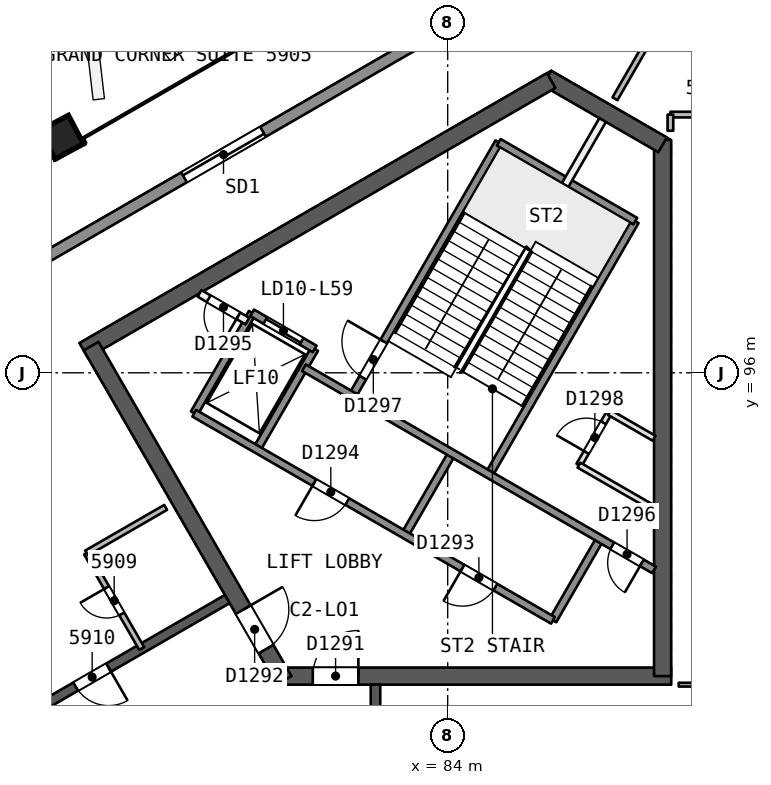
"""IFC4 building model, lengths in metres.
Left out: names, types, materials, properties, quantities, classifications, styles, units other than length and angle.
Written with IfcOpenShell. Run it as: python <this file> out.ifc"""

import sys

from ifc_helpers import new_model, si_unit, direction, frame, frame_2d, origin, origin_2d, place, context, subcontext, project, spatial, rectangle, extrude, element, fill, save


model = new_model("IFC4")
c1 = context("Model", 3, precision=1e-05, world=origin(), true_north=direction((0.0, 1.0)))
c2 = subcontext(c1, "Body", "Model", "MODEL_VIEW")
j1 = project(units=[si_unit("LENGTHUNIT", "METRE"), si_unit("PLANEANGLEUNIT", "RADIAN")], contexts=[c1])
p1 = place(None, origin())
s1 = spatial("IfcSite", under=j1, at=p1, CompositionType="ELEMENT")
p2 = place(p1, origin())
s2 = spatial("IfcBuilding", under=s1, at=p2, CompositionType="ELEMENT")
p3 = place(p2, frame((0.0, 0.0, 239.1)))
s3 = spatial("IfcBuildingStorey", under=s2, at=p3, CompositionType="ELEMENT", Elevation=239.1)
p4 = place(p3, frame((79.63, 88.019, 0.0), z_axis=(0.0, 0.0, 1.0), x_axis=(1.0, 0.0, 0.0)))
e1 = element("IfcWall", 1, at=p4, inside=s3, PredefinedType="SHEAR", context=c2, shape_type="SweptSolid", body=[
    extrude(rectangle(XDim=10.25, YDim=0.45, at=frame_2d((5.125, 0.0))), origin(), (0.0, 0.0, 1.0), 3.7),
])
p5 = place(p4, frame((0.82, 0.0, 0.0)))
e2 = element("IfcOpeningElement", 2, at=p5, cuts=e1, PredefinedType="OPENING", context=c2, shape_type="SweptSolid", body=[
    extrude(rectangle(XDim=1.2, YDim=2.1, at=frame_2d((0.6, 1.05))), frame((0.0, 0.235, 0.0), z_axis=(0.0, -1.0, 0.0), x_axis=(1.0, 0.0, 0.0)), (0.0, 0.0, 1.0), 0.471),
])
p6 = place(p3, frame((89.655, 88.019, 0.0), z_axis=(0.0, 0.0, 1.0), x_axis=(0.0, 1.0, 0.0)))
e3 = element("IfcWall", 3, at=p6, inside=s3, PredefinedType="SHEAR", context=c2, shape_type="SweptSolid", body=[
    extrude(rectangle(XDim=14.108, YDim=0.45, at=frame_2d((7.054, 0.0))), origin(), (0.0, 0.0, 1.0), 3.7),
])
p7 = place(p3, frame((89.655, 101.998, 0.0), z_axis=(0.0, 0.0, 1.0), x_axis=(-0.866042179588, 0.49997094233, 0.0)))
e4 = element("IfcWall", 4, at=p7, inside=s3, PredefinedType="SHEAR", context=c2, shape_type="SweptSolid", body=[
    extrude(rectangle(XDim=3.515, YDim=0.45, at=frame_2d((1.758, 0.0))), origin(), (0.0, 0.0, 1.0), 3.7),
])
p8 = place(p3, frame((86.723, 103.69, 0.0), z_axis=(0.0, 0.0, 1.0), x_axis=(-0.866022713978, -0.500004658852, 0.0)))
e5 = element("IfcWall", 5, at=p8, inside=s3, PredefinedType="SHEAR", context=c2, shape_type="SweptSolid", body=[
    extrude(rectangle(XDim=14.203, YDim=0.45, at=frame_2d((7.102, 0.0))), origin(), (0.0, 0.0, 1.0), 3.7),
])
p9 = place(p3, frame((74.617, 96.701, 0.0), z_axis=(0.0, 0.0, 1.0), x_axis=(0.499994385119, -0.866028645513, 0.0)))
e6 = element("IfcWall", 6, at=p9, inside=s3, PredefinedType="SHEAR", context=c2, shape_type="SweptSolid", body=[
    extrude(rectangle(XDim=10.155, YDim=0.45, at=frame_2d((5.077, 0.0))), origin(), (0.0, 0.0, 1.0), 3.7),
])
p10 = place(p9, frame((8.005, 0.0, 0.0)))
e7 = element("IfcOpeningElement", 7, at=p10, cuts=e6, PredefinedType="OPENING", context=c2, shape_type="SweptSolid", body=[
    extrude(rectangle(XDim=1.2, YDim=2.1, at=frame_2d((0.6, 1.05))), frame((0.0, 0.235, 0.0), z_axis=(0.0, -1.0, 0.0), x_axis=(1.0, 0.0, 0.0)), (0.0, 0.0, 1.0), 0.471),
])
p11 = place(p3, frame((82.1, 72.206, 0.0), z_axis=(0.0, 0.0, 1.0), x_axis=(0.0, 1.0, 0.0)))
e8 = element("IfcWall", 8, at=p11, inside=s3, PredefinedType="SHEAR", context=c2, shape_type="SweptSolid", body=[
    extrude(rectangle(XDim=15.588, YDim=0.25, at=frame_2d((7.794, 0.0))), origin(), (0.0, 0.0, 1.0), 3.3),
])
p12 = place(p11, frame((1.527, 0.0, 0.0)))
e9 = element("IfcOpeningElement", 9, at=p12, cuts=e8, PredefinedType="OPENING", context=c2, shape_type="SweptSolid", body=[
    extrude(rectangle(XDim=1.0, YDim=2.1, at=frame_2d((0.5, 1.05))), frame((0.0, 0.135, 0.0), z_axis=(0.0, -1.0, 0.0), x_axis=(1.0, 0.0, 0.0)), (0.0, 0.0, 1.0), 0.271),
])
p13 = place(p11, frame((5.396, 0.0, 0.0)))
e10 = element("IfcOpeningElement", 10, at=p13, cuts=e8, PredefinedType="OPENING", context=c2, shape_type="SweptSolid", body=[
    extrude(rectangle(XDim=0.9, YDim=2.1, at=frame_2d((0.45, 1.05))), frame((0.0, 0.135, 0.0), z_axis=(0.0, -1.0, 0.0), x_axis=(1.0, 0.0, 0.0)), (0.0, 0.0, 1.0), 0.271),
])
p14 = place(p11, frame((8.981, 0.0, 0.0)))
e11 = element("IfcOpeningElement", 11, at=p14, cuts=e8, PredefinedType="OPENING", context=c2, shape_type="SweptSolid", body=[
    extrude(rectangle(XDim=0.9, YDim=2.1, at=frame_2d((0.45, 1.05))), frame((0.0, 0.135, 0.0), z_axis=(0.0, -1.0, 0.0), x_axis=(1.0, 0.0, 0.0)), (0.0, 0.0, 1.0), 0.271),
])
p15 = place(p11, frame((12.906, 0.0, 0.0)))
e12 = element("IfcOpeningElement", 12, at=p15, cuts=e8, PredefinedType="OPENING", context=c2, shape_type="SweptSolid", body=[
    extrude(rectangle(XDim=1.0, YDim=2.1, at=frame_2d((0.5, 1.05))), frame((0.0, 0.135, 0.0), z_axis=(0.0, -1.0, 0.0), x_axis=(1.0, 0.0, 0.0)), (0.0, 0.0, 1.0), 0.271),
])
p16 = place(p3, frame((78.2, 90.046, 0.0), z_axis=(0.0, 0.0, 1.0), x_axis=(-0.866026492143, -0.499998114903, 0.0)))
e13 = element("IfcWall", 13, at=p16, inside=s3, PredefinedType="SHEAR", context=c2, shape_type="SweptSolid", body=[
    extrude(rectangle(XDim=15.588, YDim=0.25, at=frame_2d((7.794, 0.0))), origin(), (0.0, 0.0, 1.0), 3.3),
])
p17 = place(p16, frame((3.606, 0.0, 0.0)))
e14 = element("IfcOpeningElement", 14, at=p17, cuts=e13, PredefinedType="OPENING", context=c2, shape_type="SweptSolid", body=[
    extrude(rectangle(XDim=1.0, YDim=2.1, at=frame_2d((0.5, 1.05))), frame((0.0, 0.135, 0.0), z_axis=(0.0, -1.0, 0.0), x_axis=(1.0, 0.0, 0.0)), (0.0, 0.0, 1.0), 0.271),
])
p18 = place(p16, frame((8.315, 0.0, 0.0)))
e15 = element("IfcOpeningElement", 15, at=p18, cuts=e13, PredefinedType="OPENING", context=c2, shape_type="SweptSolid", body=[
    extrude(rectangle(XDim=1.1, YDim=2.1, at=frame_2d((0.55, 1.05))), frame((0.0, 0.135, 0.0), z_axis=(0.0, -1.0, 0.0), x_axis=(1.0, 0.0, 0.0)), (0.0, 0.0, 1.0), 0.271),
])
p19 = place(p16, frame((12.027, 0.0, 0.0)))
e16 = element("IfcOpeningElement", 16, at=p19, cuts=e13, PredefinedType="OPENING", context=c2, shape_type="SweptSolid", body=[
    extrude(rectangle(XDim=1.2, YDim=2.4, at=frame_2d((0.6, 1.2))), frame((0.0, 0.135, 0.0), z_axis=(0.0, -1.0, 0.0), x_axis=(1.0, 0.0, 0.0)), (0.0, 0.0, 1.0), 0.271),
])
p20 = place(p3, frame((73.841, 102.227, 0.0), z_axis=(0.000857578916, -0.022824792675, 0.999739112668), x_axis=(0.866060219769, 0.499825848733, 0.01066848966)))
e17 = element("IfcColumn", 17, at=p20, inside=s3, PredefinedType="COLUMN", context=c2, shape_type="SweptSolid", body=[
    extrude(rectangle(XDim=0.85, YDim=0.85, at=origin_2d()), origin(), (0.0, 0.0, 1.0), 3.701),
])
p21 = place(p3, frame((92.129, 87.794, 0.0), z_axis=(0.0, 0.0, 1.0), x_axis=(-1.0, 0.0, 0.0)))
e18 = element("IfcWall", 18, at=p21, inside=s3, PredefinedType="PARTITIONING", context=c2, shape_type="SweptSolid", body=[
    extrude(rectangle(XDim=2.05, YDim=0.1, at=frame_2d((1.025, 0.0))), origin(), (0.0, 0.0, 1.0), 3.3),
])
p22 = place(p21, frame((0.575, 0.0, 0.0)))
e19 = element("IfcOpeningElement", 19, at=p22, cuts=e18, PredefinedType="OPENING", context=c2, shape_type="SweptSolid", body=[
    extrude(rectangle(XDim=0.9, YDim=2.1, at=frame_2d((0.45, 1.05))), frame((0.0, 0.061, 0.0), z_axis=(0.0, -1.0, 0.0), x_axis=(1.0, 0.0, 0.0)), (0.0, 0.0, 1.0), 0.121),
])
p23 = place(p3, frame((92.088, 102.794, 0.0), z_axis=(0.0, 0.0, 1.0), x_axis=(-1.0, 0.0, 0.0)))
e20 = element("IfcWall", 20, at=p23, inside=s3, PredefinedType="PARTITIONING", context=c2, shape_type="SweptSolid", body=[
    extrude(rectangle(XDim=2.227, YDim=0.15, at=frame_2d((1.114, 0.0))), origin(), (0.0, 0.0, 1.0), 3.3),
])
p24 = place(p23, frame((0.807, 0.0, 0.0)))
e21 = element("IfcOpeningElement", 21, at=p24, cuts=e20, PredefinedType="OPENING", context=c2, shape_type="SweptSolid", body=[
    extrude(rectangle(XDim=0.8, YDim=2.1, at=frame_2d((0.4, 1.05))), frame((0.0, 0.085, 0.0), z_axis=(0.0, -1.0, 0.0), x_axis=(1.0, 0.0, 0.0)), (0.0, 0.0, 1.0), 0.171),
])
p25 = place(p3, frame((89.861, 102.794, 0.0), z_axis=(0.0, 0.0, 1.0), x_axis=(0.0, -1.0, 0.0)))
e22 = element("IfcWall", 22, at=p25, inside=s3, PredefinedType="PARTITIONING", context=c2, shape_type="SweptSolid", body=[
    extrude(rectangle(XDim=0.426, YDim=0.15, at=frame_2d((0.213, 0.0))), origin(), (0.0, 0.0, 1.0), 3.3),
])
p26 = place(p3, frame((90.004, 105.985, 0.0), z_axis=(0.0, 0.0, 1.0), x_axis=(-0.500023670775, -0.866011737025, 0.0)))
e23 = element("IfcWall", 23, at=p26, inside=s3, PredefinedType="PARTITIONING", context=c2, shape_type="SweptSolid", body=[
    extrude(rectangle(XDim=3.204, YDim=0.15, at=frame_2d((1.602, 0.0))), origin(), (0.0, 0.0, 1.0), 3.3),
])
p27 = place(p3, frame((75.948, 88.746, 0.0), z_axis=(0.0, 0.0, 1.0), x_axis=(-0.499987231761, 0.866032775405, 0.0)))
e24 = element("IfcWall", 24, at=p27, inside=s3, PredefinedType="PARTITIONING", context=c2, shape_type="SweptSolid", body=[
    extrude(rectangle(XDim=2.9, YDim=0.15, at=frame_2d((1.45, 0.0))), origin(), (0.0, 0.0, 1.0), 3.3),
])
p28 = place(p27, frame((1.05, 0.0, 0.0)))
e25 = element("IfcOpeningElement", 25, at=p28, cuts=e24, PredefinedType="OPENING", context=c2, shape_type="SweptSolid", body=[
    extrude(rectangle(XDim=0.8, YDim=2.1, at=frame_2d((0.4, 1.05))), frame((0.0, 0.085, 0.0), z_axis=(0.0, -1.0, 0.0), x_axis=(1.0, 0.0, 0.0)), (0.0, 0.0, 1.0), 0.171),
])
p29 = place(p3, frame((74.498, 91.257, 0.0), z_axis=(0.0, 0.0, 1.0), x_axis=(0.866038271014, 0.499977712642, 0.0)))
e26 = element("IfcWall", 26, at=p29, inside=s3, PredefinedType="PARTITIONING", context=c2, shape_type="SweptSolid", body=[
    extrude(rectangle(XDim=2.401, YDim=0.15, at=frame_2d((1.2, 0.0))), origin(), (0.0, 0.0, 1.0), 3.3),
])
p30 = place(p3, frame((44.845, 82.542, 0.0), z_axis=(0.0, 0.0, 1.0), x_axis=(0.866025459945, 0.499999902727, 0.0)))
e27 = element("IfcWall", 27, at=p30, inside=s3, PredefinedType="SOLIDWALL", context=c2, shape_type="SweptSolid", body=[
    extrude(rectangle(XDim=49.688, YDim=0.3, at=frame_2d((24.844, 0.0))), origin(), (0.0, 0.0, 1.0), 3.3),
])
p31 = place(p30, frame((23.8, 0.0, 0.0)))
e28 = element("IfcOpeningElement", 28, at=p31, cuts=e27, PredefinedType="OPENING", context=c2, shape_type="SweptSolid", body=[
    extrude(rectangle(XDim=2.4, YDim=2.4, at=frame_2d((1.2, 1.2))), frame((0.0, 0.161, 0.0), z_axis=(0.0, -1.0, 0.0), x_axis=(1.0, 0.0, 0.0)), (0.0, 0.0, 1.0), 0.321),
])
p32 = place(p30, frame((10.243, 0.0, 0.0)))
e29 = element("IfcOpeningElement", 29, at=p32, cuts=e27, PredefinedType="OPENING", context=c2, shape_type="SweptSolid", body=[
    extrude(rectangle(XDim=2.4, YDim=2.4, at=frame_2d((1.2, 1.2))), frame((0.0, 0.161, 0.0), z_axis=(0.0, -1.0, 0.0), x_axis=(1.0, 0.0, 0.0)), (0.0, 0.0, 1.0), 0.321),
])
p33 = place(p30, frame((37.201, 0.0, 0.0)))
e30 = element("IfcOpeningElement", 30, at=p33, cuts=e27, PredefinedType="OPENING", context=c2, shape_type="SweptSolid", body=[
    extrude(rectangle(XDim=2.4, YDim=2.4, at=frame_2d((1.2, 1.2))), frame((0.0, 0.161, 0.0), z_axis=(0.0, -1.0, 0.0), x_axis=(1.0, 0.0, 0.0)), (0.0, 0.0, 1.0), 0.321),
])
p34 = place(p3, frame((86.77, 89.486, 0.0), z_axis=(0.0, 0.0, 1.0), x_axis=(0.499961042966, 0.86604789447, 0.0)))
e31 = element("IfcWall", 31, at=p34, inside=s3, PredefinedType="SOLIDWALL", context=c2, shape_type="SweptSolid", body=[
    extrude(rectangle(XDim=2.48, YDim=0.2, at=frame_2d((1.24, 0.0))), origin(), (0.0, 0.0, 1.0), 3.3),
])
p35 = place(p3, frame((87.454, 93.571, 0.0), z_axis=(0.0, 0.0, 1.0), x_axis=(0.499995408039, 0.866028054938, 0.0)))
e32 = element("IfcWall", 32, at=p35, inside=s3, PredefinedType="PARTITIONING", context=c2, shape_type="SweptSolid", body=[
    extrude(rectangle(XDim=1.6, YDim=0.15, at=frame_2d((0.8, 0.0))), origin(), (0.0, 0.0, 1.0), 3.3),
])
p36 = place(p35, frame((0.387, 0.0, 0.0)))
e33 = element("IfcOpeningElement", 33, at=p36, cuts=e32, PredefinedType="OPENING", context=c2, shape_type="SweptSolid", body=[
    extrude(rectangle(XDim=0.9, YDim=2.1, at=frame_2d((0.45, 1.05))), frame((0.0, 0.085, 0.0), z_axis=(0.0, -1.0, 0.0), x_axis=(1.0, 0.0, 0.0)), (0.0, 0.0, 1.0), 0.171),
])
p37 = place(p3, frame((85.087, 93.321, 0.0), z_axis=(0.0, 0.0, 1.0), x_axis=(0.500019787375, 0.866013979237, 0.0)))
e34 = element("IfcWall", 34, at=p37, inside=s3, PredefinedType="SOLIDWALL", context=c2, shape_type="SweptSolid", body=[
    extrude(rectangle(XDim=7.7, YDim=0.2, at=frame_2d((3.85, 0.0))), origin(), (0.0, 0.0, 1.0), 3.3),
])
p38 = place(p3, frame((82.873, 91.736, 0.0), z_axis=(0.0, 0.0, 1.0), x_axis=(0.499961042966, 0.86604789447, 0.0)))
e35 = element("IfcWall", 35, at=p38, inside=s3, PredefinedType="SOLIDWALL", context=c2, shape_type="SweptSolid", body=[
    extrude(rectangle(XDim=2.48, YDim=0.2, at=frame_2d((1.24, 0.0))), origin(), (0.0, 0.0, 1.0), 3.3),
])
p39 = place(p3, frame((87.09, 100.94, 0.0), z_axis=(0.0, 0.0, 1.0), x_axis=(0.500011643316, 0.866018681408, 0.0)))
e36 = element("IfcWall", 36, at=p39, inside=s3, PredefinedType="PARTITIONING", context=c2, shape_type="SweptSolid", body=[
    extrude(rectangle(XDim=1.973, YDim=0.2, at=frame_2d((0.987, 0.0))), origin(), (0.0, 0.0, 1.0), 3.3),
])
p40 = place(p3, frame((81.493, 95.396, 0.0), z_axis=(0.0, 0.0, 1.0), x_axis=(0.500006057782, 0.866021906294, 0.0)))
e37 = element("IfcWall", 37, at=p40, inside=s3, PredefinedType="SOLIDWALL", context=c2, shape_type="SweptSolid", body=[
    extrude(rectangle(XDim=7.7, YDim=0.2, at=frame_2d((3.85, 0.0))), origin(), (0.0, 0.0, 1.0), 3.3),
])
p41 = place(p40, frame((0.55, 0.0, 0.0)))
e38 = element("IfcOpeningElement", 38, at=p41, cuts=e37, PredefinedType="OPENING", context=c2, shape_type="SweptSolid", body=[
    extrude(rectangle(XDim=1.1, YDim=2.1, at=frame_2d((0.55, 1.05))), frame((0.0, 0.11, 0.0), z_axis=(0.0, -1.0, 0.0), x_axis=(1.0, 0.0, 0.0)), (0.0, 0.0, 1.0), 0.221),
])
for number, where, z_axis, x_axis in (
    (39, (78.976, 93.986, 0.0), (0.0, 0.0, 1.0), (0.5, 0.866, 0.0)),
    (40, (77.33, 94.936, 0.0), (0.0, 0.0, 1.0), (0.5, 0.866, 0.0)),
):
    element("IfcWall", number, at=place(p3, frame(where, z_axis=z_axis, x_axis=x_axis)), inside=s3, PredefinedType="SOLIDWALL", context=c2, shape_type="SweptSolid", body=[
        extrude(rectangle(XDim=3.05, YDim=0.2, at=frame_2d((1.525, 0.0))), origin(), (0.0, 0.0, 1.0), 3.3),
    ])
p42 = place(p3, frame((86.77, 89.486, 0.0), z_axis=(0.0, 0.0, 1.0), x_axis=(-0.86601811187, 0.500012629753, 0.0)))
e41 = element("IfcWall", 41, at=p42, inside=s3, PredefinedType="SOLIDWALL", context=c2, shape_type="SweptSolid", body=[
    extrude(rectangle(XDim=10.9, YDim=0.2, at=frame_2d((5.45, 0.0))), origin(), (0.0, 0.0, 1.0), 3.3),
])
p43 = place(p42, frame((1.75, 0.0, 0.0)))
e42 = element("IfcOpeningElement", 42, at=p43, cuts=e41, PredefinedType="OPENING", context=c2, shape_type="SweptSolid", body=[
    extrude(rectangle(XDim=1.0, YDim=2.1, at=frame_2d((0.5, 1.05))), frame((0.0, 0.11, 0.0), z_axis=(0.0, -1.0, 0.0), x_axis=(1.0, 0.0, 0.0)), (0.0, 0.0, 1.0), 0.221),
])
p44 = place(p42, frame((6.25, 0.0, 0.0)))
e43 = element("IfcOpeningElement", 43, at=p44, cuts=e41, PredefinedType="OPENING", context=c2, shape_type="SweptSolid", body=[
    extrude(rectangle(XDim=1.0, YDim=2.1, at=frame_2d((0.5, 1.05))), frame((0.0, 0.11, 0.0), z_axis=(0.0, -1.0, 0.0), x_axis=(1.0, 0.0, 0.0)), (0.0, 0.0, 1.0), 0.221),
])
p45 = place(p3, frame((89.43, 90.814, 0.0), z_axis=(0.0, 0.0, 1.0), x_axis=(-0.866018983788, 0.500011119594, 0.0)))
e44 = element("IfcWall", 44, at=p45, inside=s3, PredefinedType="SOLIDWALL", context=c2, shape_type="SweptSolid", body=[
    extrude(rectangle(XDim=10.64, YDim=0.2, at=frame_2d((5.32, 0.0))), origin(), (0.0, 0.0, 1.0), 3.3),
])
p46 = place(p45, frame((0.37, 0.0, 0.0)))
e45 = element("IfcOpeningElement", 45, at=p46, cuts=e44, PredefinedType="OPENING", context=c2, shape_type="SweptSolid", body=[
    extrude(rectangle(XDim=0.9, YDim=2.1, at=frame_2d((0.45, 1.05))), frame((0.0, 0.11, 0.0), z_axis=(0.0, -1.0, 0.0), x_axis=(1.0, 0.0, 0.0)), (0.0, 0.0, 1.0), 0.221),
])
p47 = place(p3, frame((78.73, 97.361, 0.0), z_axis=(0.0, 0.0, 1.0), x_axis=(-0.866045896294, 0.499964504253, 0.0)))
e46 = element("IfcWall", 46, at=p47, inside=s3, PredefinedType="PARTITIONING", context=c2, shape_type="SweptSolid", body=[
    extrude(rectangle(XDim=1.455, YDim=0.2, at=frame_2d((0.728, 0.0))), origin(), (0.0, 0.0, 1.0), 3.3),
])
p48 = place(p47, frame((0.278, 0.0, 0.0)))
e47 = element("IfcOpeningElement", 47, at=p48, cuts=e46, PredefinedType="OPENING", context=c2, shape_type="SweptSolid", body=[
    extrude(rectangle(XDim=0.9, YDim=2.1, at=frame_2d((0.45, 1.05))), frame((0.0, 0.11, 0.0), z_axis=(0.0, -1.0, 0.0), x_axis=(1.0, 0.0, 0.0)), (0.0, 0.0, 1.0), 0.221),
])
p49 = place(p3, frame((80.5, 96.627, 0.0), z_axis=(0.0, 0.0, 1.0), x_axis=(-0.86601224135, 0.500022797313, 0.0)))
e48 = element("IfcWall", 48, at=p49, inside=s3, PredefinedType="SOLIDWALL", context=c2, shape_type="SweptSolid", body=[
    extrude(rectangle(XDim=1.9, YDim=0.2, at=frame_2d((0.95, 0.0))), origin(), (0.0, 0.0, 1.0), 3.3),
])
p50 = place(p49, frame((0.4, 0.0, 0.0)))
e49 = element("IfcOpeningElement", 49, at=p50, cuts=e48, PredefinedType="OPENING", context=c2, shape_type="SweptSolid", body=[
    extrude(rectangle(XDim=1.1, YDim=2.1, at=frame_2d((0.55, 1.05))), frame((0.0, 0.11, 0.0), z_axis=(0.0, -1.0, 0.0), x_axis=(1.0, 0.0, 0.0)), (0.0, 0.0, 1.0), 0.221),
])
p51 = place(p3, frame((89.43, 92.43, 0.0), z_axis=(0.0, 0.0, 1.0), x_axis=(-0.866048373726, 0.499960212783, 0.0)))
e50 = element("IfcWall", 50, at=p51, inside=s3, PredefinedType="PARTITIONING", context=c2, shape_type="SweptSolid", body=[
    extrude(rectangle(XDim=2.281, YDim=0.15, at=frame_2d((1.141, 0.0))), origin(), (0.0, 0.0, 1.0), 3.3),
])
p52 = place(p3, frame((89.43, 94.278, 0.0), z_axis=(0.0, 0.0, 1.0), x_axis=(-0.865987941628, 0.500064880745, 0.0)))
e51 = element("IfcWall", 51, at=p52, inside=s3, PredefinedType="PARTITIONING", context=c2, shape_type="SweptSolid", body=[
    extrude(rectangle(XDim=1.358, YDim=0.15, at=frame_2d((0.679, 0.0))), origin(), (0.0, 0.0, 1.0), 3.3),
])
p53 = place(p3, frame((88.937, 99.99, 0.0), z_axis=(0.0, 0.0, 1.0), x_axis=(-0.866004344652, 0.500036473714, 0.0)))
e52 = element("IfcWall", 52, at=p53, inside=s3, PredefinedType="SOLIDWALL", context=c2, shape_type="SweptSolid", body=[
    extrude(rectangle(XDim=4.15, YDim=0.2, at=frame_2d((2.075, 0.0))), origin(), (0.0, 0.0, 1.0), 3.3),
])
p54 = place(p28, origin())
e53 = element("IfcDoor", 53, at=p54, inside=s3, OperationType="SINGLE_SWING_RIGHT", PredefinedType="NOTDEFINED", context=c2, shape_type="SweptSolid", body=[
    extrude(rectangle(XDim=0.8, YDim=2.1, at=frame_2d((0.4, 1.05))), frame((0.0, 0.025, 0.0), z_axis=(0.0, -1.0, 0.0), x_axis=(1.0, 0.0, 0.0)), (0.0, 0.0, 1.0), 0.05),
])
fill(e25, e53)
p55 = place(p17, origin())
e54 = element("IfcDoor", 54, at=p55, inside=s3, OperationType="SINGLE_SWING_LEFT", PredefinedType="NOTDEFINED", context=c2, shape_type="SweptSolid", body=[
    extrude(rectangle(XDim=1.0, YDim=2.1, at=frame_2d((0.5, 1.05))), frame((0.0, 0.025, 0.0), z_axis=(0.0, -1.0, 0.0), x_axis=(1.0, 0.0, 0.0)), (0.0, 0.0, 1.0), 0.05),
])
fill(e14, e54)
p56 = place(p33, origin())
e55 = element("IfcDoor", 55, at=p56, inside=s3, OperationType="SLIDING_TO_LEFT", PredefinedType="NOTDEFINED", context=c2, shape_type="SweptSolid", body=[
    extrude(rectangle(XDim=2.4, YDim=2.4, at=frame_2d((1.2, 1.2))), frame((0.0, 0.025, 0.0), z_axis=(0.0, -1.0, 0.0), x_axis=(1.0, 0.0, 0.0)), (0.0, 0.0, 1.0), 0.05),
])
fill(e30, e55)
p57 = place(p5, origin())
e56 = element("IfcDoor", 56, at=p57, inside=s3, OperationType="SINGLE_SWING_RIGHT", PredefinedType="NOTDEFINED", context=c2, shape_type="SweptSolid", body=[
    extrude(rectangle(XDim=1.2, YDim=2.1, at=frame_2d((0.6, 1.05))), frame((0.0, 0.025, 0.0), z_axis=(0.0, -1.0, 0.0), x_axis=(1.0, 0.0, 0.0)), (0.0, 0.0, 1.0), 0.05),
])
fill(e2, e56)
p58 = place(p10, origin())
e57 = element("IfcDoor", 57, at=p58, inside=s3, OperationType="SINGLE_SWING_LEFT", PredefinedType="NOTDEFINED", context=c2, shape_type="SweptSolid", body=[
    extrude(rectangle(XDim=1.2, YDim=2.1, at=frame_2d((0.6, 1.05))), frame((0.0, 0.025, 0.0), z_axis=(0.0, -1.0, 0.0), x_axis=(1.0, 0.0, 0.0)), (0.0, 0.0, 1.0), 0.05),
])
fill(e7, e57)
p59 = place(p50, origin())
e58 = element("IfcDoor", 58, at=p59, inside=s3, OperationType="SLIDING_TO_RIGHT", PredefinedType="NOTDEFINED", context=c2, shape_type="SweptSolid", body=[
    extrude(rectangle(XDim=1.1, YDim=2.1, at=frame_2d((0.55, 1.05))), frame((0.0, 0.025, 0.0), z_axis=(0.0, -1.0, 0.0), x_axis=(1.0, 0.0, 0.0)), (0.0, 0.0, 1.0), 0.05),
])
fill(e49, e58)
p60 = place(p43, origin())
e59 = element("IfcDoor", 59, at=p60, inside=s3, OperationType="SINGLE_SWING_RIGHT", PredefinedType="NOTDEFINED", context=c2, shape_type="SweptSolid", body=[
    extrude(rectangle(XDim=1.0, YDim=2.1, at=frame_2d((0.5, 1.05))), frame((0.0, 0.025, 0.0), z_axis=(0.0, -1.0, 0.0), x_axis=(1.0, 0.0, 0.0)), (0.0, 0.0, 1.0), 0.05),
])
fill(e42, e59)
p61 = place(p44, origin())
e60 = element("IfcDoor", 60, at=p61, inside=s3, OperationType="SINGLE_SWING_RIGHT", PredefinedType="NOTDEFINED", context=c2, shape_type="SweptSolid", body=[
    extrude(rectangle(XDim=1.0, YDim=2.1, at=frame_2d((0.5, 1.05))), frame((0.0, 0.025, 0.0), z_axis=(0.0, -1.0, 0.0), x_axis=(1.0, 0.0, 0.0)), (0.0, 0.0, 1.0), 0.05),
])
fill(e43, e60)
p62 = place(p48, origin())
e61 = element("IfcDoor", 61, at=p62, inside=s3, OperationType="SINGLE_SWING_LEFT", PredefinedType="NOTDEFINED", context=c2, shape_type="SweptSolid", body=[
    extrude(rectangle(XDim=0.9, YDim=2.1, at=frame_2d((0.45, 1.05))), frame((0.0, 0.025, 0.0), z_axis=(0.0, -1.0, 0.0), x_axis=(1.0, 0.0, 0.0)), (0.0, 0.0, 1.0), 0.05),
])
fill(e47, e61)
p63 = place(p46, origin())
e62 = element("IfcDoor", 62, at=p63, inside=s3, OperationType="SINGLE_SWING_LEFT", PredefinedType="NOTDEFINED", context=c2, shape_type="SweptSolid", body=[
    extrude(rectangle(XDim=0.9, YDim=2.1, at=frame_2d((0.45, 1.05))), frame((0.0, 0.025, 0.0), z_axis=(0.0, -1.0, 0.0), x_axis=(1.0, 0.0, 0.0)), (0.0, 0.0, 1.0), 0.05),
])
fill(e45, e62)
p64 = place(p41, origin())
e63 = element("IfcDoor", 63, at=p64, inside=s3, OperationType="SINGLE_SWING_RIGHT", PredefinedType="NOTDEFINED", context=c2, shape_type="SweptSolid", body=[
    extrude(rectangle(XDim=1.1, YDim=2.1, at=frame_2d((0.55, 1.05))), frame((0.0, 0.025, 0.0), z_axis=(0.0, -1.0, 0.0), x_axis=(1.0, 0.0, 0.0)), (0.0, 0.0, 1.0), 0.05),
])
fill(e38, e63)
p65 = place(p36, origin())
e64 = element("IfcDoor", 64, at=p65, inside=s3, OperationType="SINGLE_SWING_LEFT", PredefinedType="NOTDEFINED", context=c2, shape_type="SweptSolid", body=[
    extrude(rectangle(XDim=0.9, YDim=2.1, at=frame_2d((0.45, 1.05))), frame((0.0, 0.025, 0.0), z_axis=(0.0, -1.0, 0.0), x_axis=(1.0, 0.0, 0.0)), (0.0, 0.0, 1.0), 0.05),
])
fill(e33, e64)
save(model, sys.argv[1])
